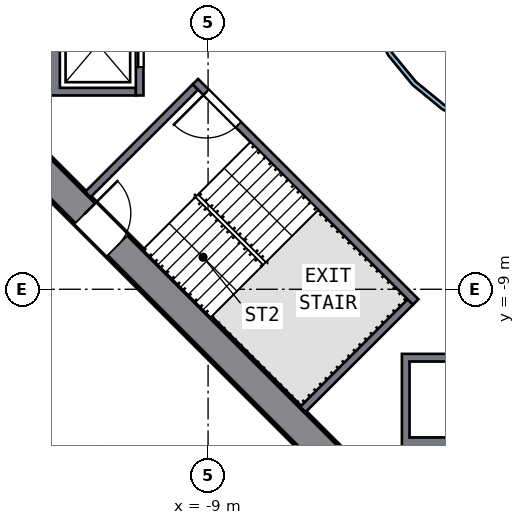
"""IFC4 building model, lengths in metres.
Left out: names, types, materials, properties, quantities, classifications, styles, units other than length and angle.
Written with IfcOpenShell. Run it as: python <this file> out.ifc"""

import sys

from ifc_helpers import new_model, si_unit, direction, frame, frame_2d, origin, place, context, subcontext, project, spatial, polyline, rectangle, outline, extrude, element, fill, save


model = new_model("IFC4")
c1 = context("Model", 3, precision=1e-05, world=origin(), true_north=direction((0.0, 1.0)))
c2 = subcontext(c1, "Body", "Model", "MODEL_VIEW")
j1 = project(units=[si_unit("LENGTHUNIT", "METRE"), si_unit("PLANEANGLEUNIT", "RADIAN")], contexts=[c1])
p1 = place(None, origin())
s1 = spatial("IfcSite", under=j1, at=p1, CompositionType="ELEMENT")
p2 = place(p1, origin())
s2 = spatial("IfcBuilding", under=s1, at=p2, CompositionType="ELEMENT")
p3 = place(p2, frame((0.0, 0.0, 93.0)))
s3 = spatial("IfcBuildingStorey", under=s2, at=p3, CompositionType="ELEMENT", Elevation=93.0)
p4 = place(p3, frame((-13.717, -5.516, 0.0), z_axis=(0.0, 0.0, 1.0), x_axis=(0.707106781, -0.707106781, 0.0)))
e1 = element("IfcWall", 1, at=p4, inside=s3, PredefinedType="SHEAR", context=c2, shape_type="SweptSolid", body=[
    extrude(rectangle(XDim=11.598, YDim=0.8, at=frame_2d((5.799, 0.0))), origin(), (0.0, 0.0, 1.0), 3.5),
])
p5 = place(p4, frame((2.099, 0.0, 0.0)))
e2 = element("IfcOpeningElement", 2, at=p5, cuts=e1, PredefinedType="OPENING", context=c2, shape_type="SweptSolid", body=[
    extrude(rectangle(XDim=1.2, YDim=2.1, at=frame_2d((0.6, 1.05))), frame((0.0, 0.41, 0.0), z_axis=(0.0, -1.0, 0.0), x_axis=(1.0, 0.0, 0.0)), (0.0, 0.0, 1.0), 0.82),
])
p6 = place(p3, origin())
e3 = element("IfcWall", 3, at=p6, inside=s3, PredefinedType="SOLIDWALL", context=c2, shape_type="SweptSolid", body=[
    extrude(outline(polyline([(-13.2, -3.9), (-13.2, -1.2), (-10.9, -1.2), (-10.9, -1.4), (-12.9, -1.4), (-12.9, -3.7), (-10.9, -3.7), (-10.9, -3.9), (-13.2, -3.9)])), origin(), (0.0, 0.0, 1.0), 3.19),
])
p7 = place(p3, frame((-10.8, -1.2, 0.0), z_axis=(0.0, 0.0, 1.0), x_axis=(0.0, -1.0, 0.0)))
e4 = element("IfcWall", 4, at=p7, inside=s3, PredefinedType="SOLIDWALL", context=c2, shape_type="SweptSolid", body=[
    extrude(rectangle(XDim=2.7, YDim=0.2, at=frame_2d((1.35, 0.0))), origin(), (0.0, 0.0, 1.0), 3.19),
])
p8 = place(p7, frame((0.75, 0.0, 0.0)))
e5 = element("IfcOpeningElement", 5, at=p8, cuts=e4, PredefinedType="OPENING", context=c2, shape_type="SweptSolid", body=[
    extrude(rectangle(XDim=1.2, YDim=2.1, at=frame_2d((0.6, 1.05))), frame((0.0, 0.11, 0.0), z_axis=(0.0, -1.0, 0.0), x_axis=(1.0, 0.0, 0.0)), (0.0, 0.0, 1.0), 0.22),
])
p9 = place(p3, origin())
e6 = element("IfcWall", 6, at=p9, inside=s3, PredefinedType="SOLIDWALL", context=c2, shape_type="SweptSolid", body=[
    extrude(outline(polyline([(-1.2, -13.2), (-3.9, -13.2), (-3.9, -10.7), (-1.2, -10.7), (-1.2, -13.2)]), holes=[polyline([(-3.7, -10.9), (-3.7, -12.9), (-1.4, -12.9), (-1.4, -10.9), (-3.7, -10.9)])]), origin(), (0.0, 0.0, 1.0), 3.19),
])
p10 = place(p3, frame((-3.535, -9.334, 0.0), z_axis=(0.0, 0.0, 1.0), x_axis=(-0.707106781, 0.707106781, 0.0)))
e7 = element("IfcWall", 7, at=p10, inside=s3, PredefinedType="SOLIDWALL", context=c2, shape_type="SweptSolid", body=[
    extrude(rectangle(XDim=8.2, YDim=0.2, at=frame_2d((4.1, 0.0))), origin(), (0.0, 0.0, 1.0), 3.19),
])
p11 = place(p10, frame((6.6, 0.0, 0.0)))
e8 = element("IfcOpeningElement", 8, at=p11, cuts=e7, PredefinedType="OPENING", context=c2, shape_type="SweptSolid", body=[
    extrude(rectangle(XDim=1.2, YDim=2.1, at=frame_2d((0.6, 1.05))), frame((0.0, 0.11, 0.0), z_axis=(0.0, -1.0, 0.0), x_axis=(1.0, 0.0, 0.0)), (0.0, 0.0, 1.0), 0.22),
])
for number, where, z_axis, x_axis in (
    (9, (-9.334, -3.677, 0.0), (0.0, 0.0, 1.0), (-0.707, -0.707, 0.0)),
    (10, (-3.677, -9.334, 0.0), (0.0, 0.0, 1.0), (-0.707, -0.707, 0.0)),
):
    element("IfcWall", number, at=place(p3, frame(where, z_axis=z_axis, x_axis=x_axis)), inside=s3, PredefinedType="SOLIDWALL", context=c2, shape_type="SweptSolid", body=[
        extrude(rectangle(XDim=4.0, YDim=0.2, at=frame_2d((2.0, 0.0))), origin(), (0.0, 0.0, 1.0), 3.19),
    ])
p12 = place(p3, origin())
e11 = element("IfcWall", 11, at=p12, inside=s3, PredefinedType="SOLIDWALL", context=c2, shape_type="SweptSolid", body=[
    extrude(outline(polyline([(5.021, -0.999), (4.73, -1.959), (4.257, -2.844), (3.62, -3.62), (2.844, -4.257), (1.959, -4.73), (0.999, -5.021), (0.0, -5.12), (-0.999, -5.021), (-1.959, -4.73), (-2.844, -4.257), (-3.62, -3.62), (-4.257, -2.844), (-4.73, -1.959), (-5.021, -0.999), (-5.12, 0.0), (-5.021, 0.999), (-4.73, 1.959), (-4.257, 2.844), (-3.62, 3.62), (-2.844, 4.257), (-1.959, 4.73), (-0.999, 5.021), (0.0, 5.12), (0.999, 5.021), (1.959, 4.73), (2.844, 4.257), (3.62, 3.62), (4.257, 2.844), (4.73, 1.959), (5.021, 0.999), (5.12, 0.0), (5.021, -0.999)]), holes=[polyline([(4.904, 0.976), (4.619, 1.913), (4.157, 2.778), (3.535, 3.535), (2.778, 4.157), (1.913, 4.619), (0.976, 4.904), (0.0, 5.0), (-0.976, 4.904), (-1.913, 4.619), (-2.778, 4.157), (-3.535, 3.535), (-4.157, 2.778), (-4.619, 1.913), (-4.904, 0.976), (-5.0, 0.0), (-4.904, -0.976), (-4.619, -1.913), (-4.157, -2.778), (-3.535, -3.535), (-2.778, -4.157), (-1.913, -4.619), (-0.976, -4.904), (0.0, -5.0), (0.976, -4.904), (1.913, -4.619), (2.778, -4.157), (3.535, -3.535), (4.157, -2.778), (4.619, -1.913), (4.904, -0.976), (5.0, 0.0), (4.904, 0.976)])]), origin(), (0.0, 0.0, 1.0), 3.19),
])
p13 = place(p8, origin())
e12 = element("IfcDoor", 12, at=p13, inside=s3, OperationType="DOUBLE_DOOR_SLIDING", PredefinedType="DOOR", context=c2, shape_type="SweptSolid", body=[
    extrude(rectangle(XDim=1.2, YDim=2.1, at=frame_2d((0.6, 1.05))), frame((0.0, 0.025, 0.0), z_axis=(0.0, -1.0, 0.0), x_axis=(1.0, 0.0, 0.0)), (0.0, 0.0, 1.0), 0.05),
])
fill(e5, e12)
p14 = place(p11, origin())
e13 = element("IfcDoor", 13, at=p14, inside=s3, OperationType="SINGLE_SWING_RIGHT", PredefinedType="DOOR", context=c2, shape_type="SweptSolid", body=[
    extrude(rectangle(XDim=1.2, YDim=2.1, at=frame_2d((0.6, 1.05))), frame((0.0, 0.025, 0.0), z_axis=(0.0, -1.0, 0.0), x_axis=(1.0, 0.0, 0.0)), (0.0, 0.0, 1.0), 0.05),
])
fill(e8, e13)
p15 = place(p5, origin())
e14 = element("IfcDoor", 14, at=p15, inside=s3, OperationType="SINGLE_SWING_LEFT", PredefinedType="DOOR", context=c2, shape_type="SweptSolid", body=[
    extrude(rectangle(XDim=1.2, YDim=2.1, at=frame_2d((0.6, 1.05))), frame((0.0, 0.025, 0.0), z_axis=(0.0, -1.0, 0.0), x_axis=(1.0, 0.0, 0.0)), (0.0, 0.0, 1.0), 0.05),
])
fill(e2, e14)
save(model, sys.argv[1])
